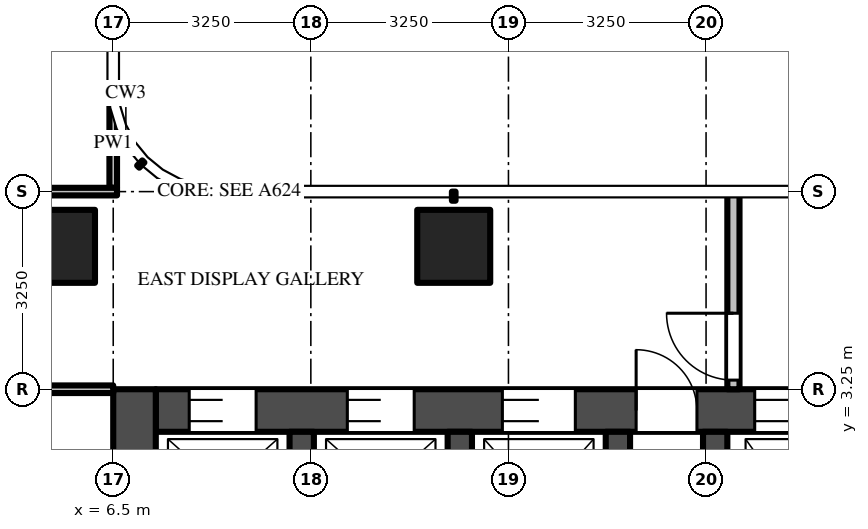
"""IFC4 building model, lengths in metres.
Left out: names, types, materials, properties, quantities, classifications, styles, units other than length and angle.
Written with IfcOpenShell. Run it as: python <this file> out.ifc"""

import sys

from ifc_helpers import new_model, si_unit, direction, frame, frame_2d, origin, origin_2d, place, context, subcontext, project, spatial, rectangle, extrude, source, transform, mapped, element, fill, save


model = new_model("IFC4")
c1 = context("Model", 3, precision=1e-05, world=origin(), true_north=direction((0.0, 1.0)))
c2 = subcontext(c1, "Body", "Model", "MODEL_VIEW")
j1 = project(units=[si_unit("LENGTHUNIT", "METRE"), si_unit("PLANEANGLEUNIT", "RADIAN")], contexts=[c1])
p1 = place(None, origin())
s1 = spatial("IfcSite", under=j1, at=p1, CompositionType="ELEMENT")
p2 = place(p1, origin())
s2 = spatial("IfcBuilding", under=s1, at=p2, CompositionType="ELEMENT")
p3 = place(p2, frame((0.0, 0.0, 197.1)))
s3 = spatial("IfcBuildingStorey", under=s2, at=p3, CompositionType="ELEMENT", Elevation=197.1)
m1 = source(origin(), c2, "Body", "SweptSolid", [
    extrude(rectangle(XDim=1.2, YDim=1.2, at=origin_2d()), origin(), (0.0, 0.0, 1.0), 3.9),
])
for number, where, z_axis, x_axis in (
    (1, (12.1, 5.6, 0.0), (0.0, 0.0, 1.0), (1.0, 0.0, 0.0)),
    (2, (5.6, 5.6, 0.0), (0.0, 0.0, 1.0), (1.0, 0.0, 0.0)),
):
    element("IfcColumn", number, at=place(p3, frame(where, z_axis=z_axis, x_axis=x_axis)), inside=s3, PredefinedType="COLUMN", context=c2, shape_type="MappedRepresentation", body=[
        mapped(m1, transform((0.0, 0.0, 0.0))),
    ])
m2 = source(origin(), c2, "Body", "SweptSolid", [
    extrude(rectangle(XDim=14.85, YDim=0.7, at=frame_2d((7.425, 0.0))), origin(), (0.0, 0.0, 1.0), 3.7),
])
p4 = place(p3, frame((7.2, 2.9, 0.0), z_axis=(0.0, 0.0, 1.0), x_axis=(1.0, 0.0, 0.0)))
e3 = element("IfcWall", 3, at=p4, inside=s3, PredefinedType="SHEAR", context=c2, shape_type="MappedRepresentation", body=[
    mapped(m2, transform((0.0, 0.0, 0.0))),
])
m3 = source(origin(), c2, "Body", "SweptSolid", [
    extrude(rectangle(XDim=1.1, YDim=2.1, at=frame_2d((0.55, 1.05))), frame((0.0, 0.36, 0.0), z_axis=(0.0, -1.0, 0.0), x_axis=(1.0, 0.0, 0.0)), (0.0, 0.0, 1.0), 0.72),
])
p5 = place(p4, frame((0.55, 0.0, 0.0)))
e4 = element("IfcOpeningElement", 4, at=p5, cuts=e3, PredefinedType="OPENING", context=c2, shape_type="MappedRepresentation", body=[
    mapped(m3, transform((0.0, 0.0, 0.0))),
])
p6 = place(p4, frame((3.15, 0.0, 0.0)))
e5 = element("IfcOpeningElement", 5, at=p6, cuts=e3, PredefinedType="OPENING", context=c2, shape_type="MappedRepresentation", body=[
    mapped(m3, transform((0.0, 0.0, 0.0))),
])
m4 = source(origin(), c2, "Body", "SweptSolid", [
    extrude(rectangle(XDim=1.2, YDim=2.1, at=frame_2d((0.6, 1.05))), frame((0.0, 0.36, 0.0), z_axis=(0.0, -1.0, 0.0), x_axis=(1.0, 0.0, 0.0)), (0.0, 0.0, 1.0), 0.72),
])
p7 = place(p4, frame((5.7, 0.0, 0.0)))
e6 = element("IfcOpeningElement", 6, at=p7, cuts=e3, PredefinedType="OPENING", context=c2, shape_type="MappedRepresentation", body=[
    mapped(m4, transform((0.0, 0.0, 0.0))),
])
m5 = source(origin(), c2, "Body", "SweptSolid", [
    extrude(rectangle(XDim=1.3, YDim=2.1, at=frame_2d((0.65, 1.05))), frame((0.0, 0.36, 0.0), z_axis=(0.0, -1.0, 0.0), x_axis=(1.0, 0.0, 0.0)), (0.0, 0.0, 1.0), 0.72),
])
p8 = place(p4, frame((12.2, 0.0, 0.0)))
e7 = element("IfcOpeningElement", 7, at=p8, cuts=e3, PredefinedType="OPENING", context=c2, shape_type="MappedRepresentation", body=[
    mapped(m5, transform((0.0, 0.0, 0.0))),
])
p9 = place(p4, frame((9.85, 0.0, 0.0)))
e8 = element("IfcOpeningElement", 8, at=p9, cuts=e3, PredefinedType="OPENING", context=c2, shape_type="MappedRepresentation", body=[
    mapped(m4, transform((0.0, 0.0, 0.0))),
])
m6 = source(origin(), c2, "Body", "SweptSolid", [
    extrude(rectangle(XDim=1.0, YDim=2.1, at=frame_2d((0.5, 1.05))), frame((0.0, 0.36, 0.0), z_axis=(0.0, -1.0, 0.0), x_axis=(1.0, 0.0, 0.0)), (0.0, 0.0, 1.0), 0.72),
])
p10 = place(p4, frame((7.9, 0.0, 0.0)))
e9 = element("IfcOpeningElement", 9, at=p10, cuts=e3, PredefinedType="OPENING", context=c2, shape_type="MappedRepresentation", body=[
    mapped(m6, transform((0.0, 0.0, 0.0))),
])
m7 = source(origin(), c2, "Body", "SweptSolid", [
    extrude(rectangle(XDim=9.05, YDim=0.7, at=frame_2d((4.525, 0.0))), origin(), (0.0, 0.0, 1.0), 3.7),
])
p11 = place(p3, frame((6.85, -5.8, 0.0), z_axis=(0.0, 0.0, 1.0), x_axis=(0.0, 1.0, 0.0)))
e10 = element("IfcWall", 10, at=p11, inside=s3, PredefinedType="SHEAR", context=c2, shape_type="MappedRepresentation", body=[
    mapped(m7, transform((0.0, 0.0, 0.0))),
])
m8 = source(origin(), c2, "Body", "SweptSolid", [
    extrude(rectangle(XDim=1.8, YDim=2.1, at=frame_2d((0.9, 1.05))), frame((0.0, 0.36, 0.0), z_axis=(0.0, -1.0, 0.0), x_axis=(1.0, 0.0, 0.0)), (0.0, 0.0, 1.0), 0.72),
])
p12 = place(p11, frame((3.15, 0.0, 0.0)))
e11 = element("IfcOpeningElement", 11, at=p12, cuts=e10, PredefinedType="OPENING", context=c2, shape_type="MappedRepresentation", body=[
    mapped(m8, transform((0.0, 0.0, 0.0))),
])
m9 = source(origin(), c2, "Body", "SweptSolid", [
    extrude(rectangle(XDim=2.45, YDim=0.4, at=frame_2d((1.225, 0.0))), origin(), (0.0, 0.0, 1.0), 3.7),
])
for number, where, z_axis, x_axis in (
    (12, (9.6, 0.1, 0.0), (0.0, 0.0, 1.0), (0.0, 1.0, 0.0)),
    (13, (12.2, 0.1, 0.0), (0.0, 0.0, 1.0), (0.0, 1.0, 0.0)),
    (14, (14.8, 0.1, 0.0), (0.0, 0.0, 1.0), (0.0, 1.0, 0.0)),
    (15, (16.4, 0.1, 0.0), (0.0, 0.0, 1.0), (0.0, 1.0, 0.0)),
):
    element("IfcWall", number, at=place(p3, frame(where, z_axis=z_axis, x_axis=x_axis)), inside=s3, PredefinedType="SHEAR", context=c2, shape_type="MappedRepresentation", body=[
        mapped(m9, transform((0.0, 0.0, 0.0))),
    ])
m10 = source(origin(), c2, "Body", "SweptSolid", [
    extrude(rectangle(XDim=3.25, YDim=0.2, at=frame_2d((1.625, 0.0))), origin(), (0.0, 0.0, 1.0), 3.7),
])
p13 = place(p3, frame((16.7, 3.25, 0.0), z_axis=(0.0, 0.0, 1.0), x_axis=(0.0, 1.0, 0.0)))
e16 = element("IfcWall", 16, at=p13, inside=s3, PredefinedType="PARTITIONING", context=c2, shape_type="MappedRepresentation", body=[
    mapped(m10, transform((0.0, 0.0, 0.0))),
])
m11 = source(origin(), c2, "Body", "SweptSolid", [
    extrude(rectangle(XDim=1.1, YDim=2.1, at=frame_2d((0.55, 1.05))), frame((0.0, 0.11, 0.0), z_axis=(0.0, -1.0, 0.0), x_axis=(1.0, 0.0, 0.0)), (0.0, 0.0, 1.0), 0.22),
])
p14 = place(p13, frame((0.15, 0.0, 0.0)))
e17 = element("IfcOpeningElement", 17, at=p14, cuts=e16, PredefinedType="OPENING", context=c2, shape_type="MappedRepresentation", body=[
    mapped(m11, transform((0.0, 0.0, 0.0))),
])
m12 = source(origin(), c2, "Body", "SweptSolid", [
    extrude(rectangle(XDim=1.469, YDim=0.125, at=frame_2d((0.734, 0.0))), origin(), (0.0, 0.0, 1.0), 3.7),
])
p15 = place(p3, frame((6.5, 6.562, 0.0), z_axis=(0.0, 0.0, 1.0), x_axis=(0.0, 1.0, 0.0)))
e18 = element("IfcWall", 18, at=p15, inside=s3, PredefinedType="PARTITIONING", context=c2, shape_type="MappedRepresentation", body=[
    mapped(m12, transform((0.0, 0.0, 0.0))),
])
m13 = source(origin(), c2, "Body", "SweptSolid", [
    extrude(rectangle(XDim=5.363, YDim=0.125, at=frame_2d((2.681, 0.0))), origin(), (0.0, 0.0, 1.0), 2.997),
])
p16 = place(p3, frame((1.137, 3.25, 0.0), z_axis=(0.0, 0.0, 1.0), x_axis=(1.0, 0.0, 0.0)))
e19 = element("IfcWall", 19, at=p16, inside=s3, PredefinedType="PARTITIONING", context=c2, shape_type="MappedRepresentation", body=[
    mapped(m13, transform((0.0, 0.0, 0.0))),
])
m14 = source(origin(), c2, "Body", "SweptSolid", [
    extrude(rectangle(XDim=5.425, YDim=0.125, at=frame_2d((2.712, 0.0))), origin(), (0.0, 0.0, 1.0), 2.78),
])
p17 = place(p3, frame((1.137, 6.5, 0.0), z_axis=(0.0, 0.0, 1.0), x_axis=(1.0, 0.0, 0.0)))
e20 = element("IfcWall", 20, at=p17, inside=s3, PredefinedType="PARTITIONING", context=c2, shape_type="MappedRepresentation", body=[
    mapped(m14, transform((0.0, 0.0, 0.0))),
])
m15 = source(origin(), c2, "Body", "SweptSolid", [
    extrude(rectangle(XDim=1.1, YDim=2.1, at=frame_2d((0.55, 1.05))), frame((0.0, -0.275, 0.0), z_axis=(0.0, -1.0, 0.0), x_axis=(1.0, 0.0, 0.0)), (0.0, 0.0, 1.0), 0.05),
])
p18 = place(p5, origin())
e21 = element("IfcDoor", 21, at=p18, inside=s3, OperationType="DOUBLE_DOOR_SLIDING", PredefinedType="DOOR", context=c2, shape_type="MappedRepresentation", body=[
    mapped(m15, transform((0.0, 0.0, 0.0))),
])
fill(e4, e21)
p19 = place(p6, origin())
e22 = element("IfcDoor", 22, at=p19, inside=s3, OperationType="DOUBLE_DOOR_SLIDING", PredefinedType="DOOR", context=c2, shape_type="MappedRepresentation", body=[
    mapped(m15, transform((0.0, 0.0, 0.0))),
])
fill(e5, e22)
m16 = source(origin(), c2, "Body", "SweptSolid", [
    extrude(rectangle(XDim=1.2, YDim=2.1, at=frame_2d((0.6, 1.05))), frame((0.0, -0.275, 0.0), z_axis=(0.0, -1.0, 0.0), x_axis=(1.0, 0.0, 0.0)), (0.0, 0.0, 1.0), 0.05),
])
p20 = place(p7, origin())
e23 = element("IfcDoor", 23, at=p20, inside=s3, OperationType="DOUBLE_DOOR_SLIDING", PredefinedType="DOOR", context=c2, shape_type="MappedRepresentation", body=[
    mapped(m16, transform((0.0, 0.0, 0.0))),
])
fill(e6, e23)
p21 = place(p9, origin())
e24 = element("IfcDoor", 24, at=p21, inside=s3, OperationType="DOUBLE_DOOR_SLIDING", PredefinedType="DOOR", context=c2, shape_type="MappedRepresentation", body=[
    mapped(m16, transform((0.0, 0.0, 0.0))),
])
fill(e8, e24)
m17 = source(origin(), c2, "Body", "SweptSolid", [
    extrude(rectangle(XDim=1.0, YDim=2.1, at=frame_2d((0.5, 1.05))), frame((0.0, -0.275, 0.0), z_axis=(0.0, -1.0, 0.0), x_axis=(1.0, 0.0, 0.0)), (0.0, 0.0, 1.0), 0.05),
])
p22 = place(p10, origin())
e25 = element("IfcDoor", 25, at=p22, inside=s3, OperationType="SINGLE_SWING_LEFT", PredefinedType="DOOR", context=c2, shape_type="MappedRepresentation", body=[
    mapped(m17, transform((0.0, 0.0, 0.0))),
])
fill(e9, e25)
m18 = source(origin(), c2, "Body", "SweptSolid", [
    extrude(rectangle(XDim=1.1, YDim=2.1, at=frame_2d((0.55, 1.05))), frame((0.0, 0.025, 0.0), z_axis=(0.0, -1.0, 0.0), x_axis=(1.0, 0.0, 0.0)), (0.0, 0.0, 1.0), 0.05),
])
p23 = place(p14, origin())
e26 = element("IfcDoor", 26, at=p23, inside=s3, OperationType="SINGLE_SWING_RIGHT", PredefinedType="DOOR", context=c2, shape_type="MappedRepresentation", body=[
    mapped(m18, transform((0.0, 0.0, 0.0))),
])
fill(e17, e26)
save(model, sys.argv[1])
